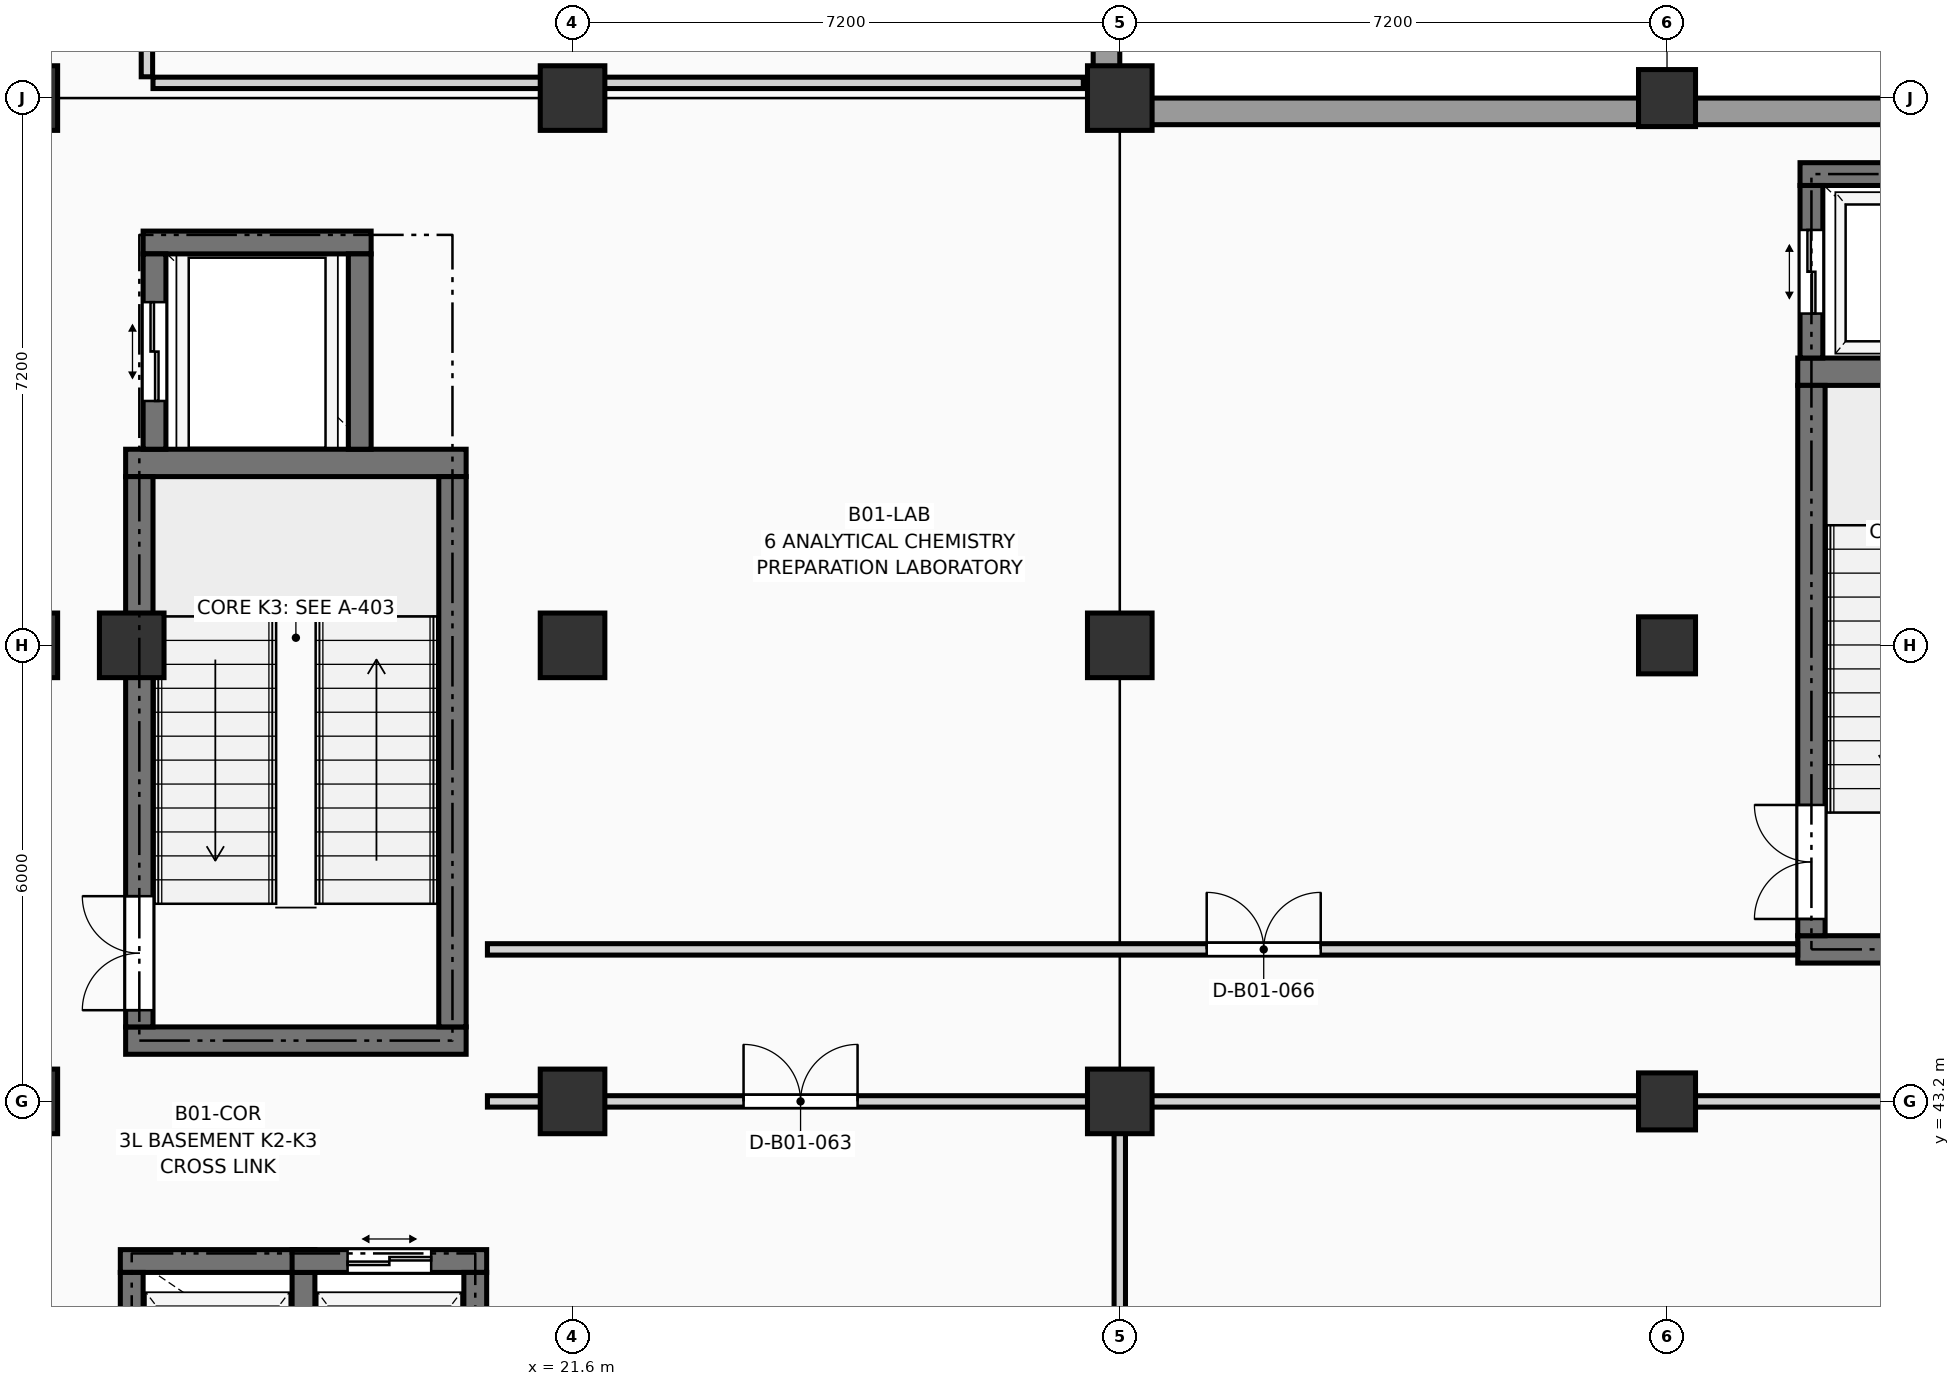
"""IFC4 building model, lengths in metres.
Left out: names, types, materials, properties, quantities, classifications, styles, units other than length and angle.
Written with IfcOpenShell. Run it as: python <this file> out.ifc"""

import sys

from ifc_helpers import new_model, si_unit, direction, frame, frame_2d, origin, origin_2d, place, context, subcontext, project, spatial, rectangle, extrude, element, fill, save


model = new_model("IFC4")
c1 = context("Model", 3, precision=1e-05, world=origin(), true_north=direction((0.0, 1.0)))
c2 = subcontext(c1, "Body", "Model", "MODEL_VIEW")
j1 = project(units=[si_unit("LENGTHUNIT", "METRE"), si_unit("PLANEANGLEUNIT", "RADIAN")], contexts=[c1])
p1 = place(None, origin())
s1 = spatial("IfcSite", under=j1, at=p1, CompositionType="ELEMENT")
p2 = place(p1, origin())
s2 = spatial("IfcBuilding", under=s1, at=p2, CompositionType="ELEMENT")
p3 = place(p2, frame((0.0, 0.0, -4.5)))
s3 = spatial("IfcBuildingStorey", under=s2, at=p3, CompositionType="ELEMENT", Elevation=-4.5)
for number, where, z_axis, x_axis in (
    (1, (14.4, 43.2, 0.0), (0.0, 0.0, 1.0), (1.0, 0.0, 0.0)),
    (2, (14.4, 49.2, 0.0), (0.0, 0.0, 1.0), (1.0, 0.0, 0.0)),
    (3, (14.4, 56.4, 0.0), (0.0, 0.0, 1.0), (1.0, 0.0, 0.0)),
    (4, (15.8, 49.2, 0.0), (0.0, 0.0, 1.0), (1.0, 0.0, 0.0)),
    (5, (21.6, 43.2, 0.0), (0.0, 0.0, 1.0), (1.0, 0.0, 0.0)),
    (6, (21.6, 49.2, 0.0), (0.0, 0.0, 1.0), (1.0, 0.0, 0.0)),
    (7, (21.6, 56.4, 0.0), (0.0, 0.0, 1.0), (1.0, 0.0, 0.0)),
):
    element("IfcColumn", number, at=place(p3, frame(where, z_axis=z_axis, x_axis=x_axis)), inside=s3, PredefinedType="COLUMN", context=c2, shape_type="SweptSolid", body=[
        extrude(rectangle(XDim=0.85, YDim=0.85, at=origin_2d()), origin(), (0.0, 0.0, 1.0), 4.5),
    ])
for number, where, z_axis, x_axis in (
    (8, (28.8, 43.2, -0.3), (0.0, 0.0, 1.0), (1.0, 0.0, 0.0)),
    (9, (28.8, 49.2, -0.3), (0.0, 0.0, 1.0), (1.0, 0.0, 0.0)),
    (10, (28.8, 56.4, -0.3), (0.0, 0.0, 1.0), (1.0, 0.0, 0.0)),
):
    element("IfcColumn", number, at=place(p3, frame(where, z_axis=z_axis, x_axis=x_axis)), inside=s3, PredefinedType="COLUMN", context=c2, shape_type="SweptSolid", body=[
        extrude(rectangle(XDim=0.85, YDim=0.85, at=origin_2d()), origin(), (0.0, 0.0, 1.0), 4.8),
    ])
for number, where, z_axis, x_axis in (
    (11, (36.0, 43.2, 0.0), (0.0, 0.0, 1.0), (1.0, 0.0, 0.0)),
    (12, (36.0, 49.2, 0.0), (0.0, 0.0, 1.0), (1.0, 0.0, 0.0)),
    (13, (36.0, 56.4, 0.0), (0.0, 0.0, 1.0), (1.0, 0.0, 0.0)),
):
    element("IfcColumn", number, at=place(p3, frame(where, z_axis=z_axis, x_axis=x_axis)), inside=s3, PredefinedType="COLUMN", context=c2, shape_type="SweptSolid", body=[
        extrude(rectangle(XDim=0.75, YDim=0.75, at=origin_2d()), origin(), (0.0, 0.0, 1.0), 4.5),
    ])
p4 = place(p3, frame((28.625, 85.2, -0.3), z_axis=(0.0, 0.0, 1.0), x_axis=(0.0, -1.0, 0.0)))
e14 = element("IfcWall", 14, at=p4, inside=s3, PredefinedType="USERDEFINED", context=c2, shape_type="SweptSolid", body=[
    extrude(rectangle(XDim=28.8, YDim=0.35, at=frame_2d((14.4, 0.0))), origin(), (0.0, 0.0, 1.0), 4.54),
])
p5 = place(p3, frame((28.8, 56.225, -0.3), z_axis=(0.0, 0.0, 1.0), x_axis=(1.0, 0.0, 0.0)))
e15 = element("IfcWall", 15, at=p5, inside=s3, PredefinedType="USERDEFINED", context=c2, shape_type="SweptSolid", body=[
    extrude(rectangle(XDim=36.0, YDim=0.35, at=frame_2d((18.0, 0.0))), origin(), (0.0, 0.0, 1.0), 4.54),
])
for number, where, z_axis, x_axis in (
    (16, (15.72, 44.0, -0.3), (0.0, 0.0, 1.0), (1.0, 0.0, 0.0)),
    (17, (15.72, 51.6, -0.3), (0.0, 0.0, 1.0), (1.0, 0.0, 0.0)),
):
    element("IfcWall", number, at=place(p3, frame(where, z_axis=z_axis, x_axis=x_axis)), inside=s3, PredefinedType="SHEAR", context=c2, shape_type="SweptSolid", body=[
        extrude(rectangle(XDim=4.48, YDim=0.36, at=frame_2d((2.24, 0.0))), origin(), (0.0, 0.0, 1.0), 4.54),
    ])
p6 = place(p3, frame((15.9, 44.18, -0.3), z_axis=(0.0, 0.0, 1.0), x_axis=(0.0, 1.0, 0.0)))
e18 = element("IfcWall", 18, at=p6, inside=s3, PredefinedType="SHEAR", context=c2, shape_type="SweptSolid", body=[
    extrude(rectangle(XDim=7.24, YDim=0.36, at=frame_2d((3.62, 0.0))), origin(), (0.0, 0.0, 1.0), 4.54),
])
p7 = place(p6, frame((0.22, 0.0, 0.3)))
e19 = element("IfcOpeningElement", 19, at=p7, cuts=e18, PredefinedType="OPENING", context=c2, shape_type="SweptSolid", body=[
    extrude(rectangle(XDim=1.5, YDim=2.2, at=frame_2d((0.75, 1.1))), frame((0.0, 0.192, 0.0), z_axis=(0.0, -1.0, 0.0), x_axis=(1.0, 0.0, 0.0)), (0.0, 0.0, 1.0), 0.384),
])
p8 = place(p3, frame((20.02, 44.18, -0.3), z_axis=(0.0, 0.0, 1.0), x_axis=(0.0, 1.0, 0.0)))
e20 = element("IfcWall", 20, at=p8, inside=s3, PredefinedType="SHEAR", context=c2, shape_type="SweptSolid", body=[
    extrude(rectangle(XDim=7.24, YDim=0.36, at=frame_2d((3.62, 0.0))), origin(), (0.0, 0.0, 1.0), 4.54),
])
for number, where, z_axis, x_axis in (
    (21, (37.72, 45.2, -0.3), (0.0, 0.0, 1.0), (1.0, 0.0, 0.0)),
    (22, (37.72, 52.8, -0.3), (0.0, 0.0, 1.0), (1.0, 0.0, 0.0)),
):
    element("IfcWall", number, at=place(p3, frame(where, z_axis=z_axis, x_axis=x_axis)), inside=s3, PredefinedType="SHEAR", context=c2, shape_type="SweptSolid", body=[
        extrude(rectangle(XDim=4.48, YDim=0.36, at=frame_2d((2.24, 0.0))), origin(), (0.0, 0.0, 1.0), 4.54),
    ])
p9 = place(p3, frame((37.9, 45.38, -0.3), z_axis=(0.0, 0.0, 1.0), x_axis=(0.0, 1.0, 0.0)))
e23 = element("IfcWall", 23, at=p9, inside=s3, PredefinedType="SHEAR", context=c2, shape_type="SweptSolid", body=[
    extrude(rectangle(XDim=7.24, YDim=0.36, at=frame_2d((3.62, 0.0))), origin(), (0.0, 0.0, 1.0), 4.54),
])
p10 = place(p9, frame((0.22, 0.0, 0.3)))
e24 = element("IfcOpeningElement", 24, at=p10, cuts=e23, PredefinedType="OPENING", context=c2, shape_type="SweptSolid", body=[
    extrude(rectangle(XDim=1.5, YDim=2.2, at=frame_2d((0.75, 1.1))), frame((0.0, 0.192, 0.0), z_axis=(0.0, -1.0, 0.0), x_axis=(1.0, 0.0, 0.0)), (0.0, 0.0, 1.0), 0.384),
])
p11 = place(p3, frame((15.65, 41.1, -1.6), z_axis=(0.0, 0.0, 1.0), x_axis=(1.0, 0.0, 0.0)))
e25 = element("IfcWall", 25, at=p11, inside=s3, PredefinedType="SHEAR", context=c2, shape_type="SweptSolid", body=[
    extrude(rectangle(XDim=2.56, YDim=0.3, at=frame_2d((1.28, 0.0))), origin(), (0.0, 0.0, 1.0), 5.84),
])
p12 = place(p3, frame((15.8, 37.98, -1.6), z_axis=(0.0, 0.0, 1.0), x_axis=(0.0, 1.0, 0.0)))
e26 = element("IfcWall", 26, at=p12, inside=s3, PredefinedType="SHEAR", context=c2, shape_type="SweptSolid", body=[
    extrude(rectangle(XDim=2.97, YDim=0.3, at=frame_2d((1.485, 0.0))), origin(), (0.0, 0.0, 1.0), 5.84),
])
p13 = place(p12, frame((0.935, 0.0, 1.6)))
e27 = element("IfcOpeningElement", 27, at=p13, cuts=e26, PredefinedType="OPENING", context=c2, shape_type="SweptSolid", body=[
    extrude(rectangle(XDim=1.1, YDim=2.2, at=frame_2d((0.55, 1.1))), frame((0.0, 0.162, 0.0), z_axis=(0.0, -1.0, 0.0), x_axis=(1.0, 0.0, 0.0)), (0.0, 0.0, 1.0), 0.324),
])
p14 = place(p3, frame((18.06, 37.98, -1.6), z_axis=(0.0, 0.0, 1.0), x_axis=(0.0, 1.0, 0.0)))
e28 = element("IfcWall", 28, at=p14, inside=s3, PredefinedType="SHEAR", context=c2, shape_type="SweptSolid", body=[
    extrude(rectangle(XDim=2.97, YDim=0.3, at=frame_2d((1.485, 0.0))), origin(), (0.0, 0.0, 1.0), 5.84),
])
p15 = place(p3, frame((17.91, 41.1, -1.6), z_axis=(0.0, 0.0, 1.0), x_axis=(1.0, 0.0, 0.0)))
e29 = element("IfcWall", 29, at=p15, inside=s3, PredefinedType="SHEAR", context=c2, shape_type="SweptSolid", body=[
    extrude(rectangle(XDim=2.56, YDim=0.3, at=frame_2d((1.28, 0.0))), origin(), (0.0, 0.0, 1.0), 5.84),
])
p16 = place(p15, frame((0.73, 0.0, 1.6)))
e30 = element("IfcOpeningElement", 30, at=p16, cuts=e29, PredefinedType="OPENING", context=c2, shape_type="SweptSolid", body=[
    extrude(rectangle(XDim=1.1, YDim=2.2, at=frame_2d((0.55, 1.1))), frame((0.0, 0.162, 0.0), z_axis=(0.0, -1.0, 0.0), x_axis=(1.0, 0.0, 0.0)), (0.0, 0.0, 1.0), 0.324),
])
p17 = place(p3, frame((20.32, 37.98, -1.6), z_axis=(0.0, 0.0, 1.0), x_axis=(0.0, 1.0, 0.0)))
e31 = element("IfcWall", 31, at=p17, inside=s3, PredefinedType="SHEAR", context=c2, shape_type="SweptSolid", body=[
    extrude(rectangle(XDim=2.97, YDim=0.3, at=frame_2d((1.485, 0.0))), origin(), (0.0, 0.0, 1.0), 5.84),
])
p18 = place(p3, frame((37.75, 55.4, -1.6), z_axis=(0.0, 0.0, 1.0), x_axis=(1.0, 0.0, 0.0)))
e32 = element("IfcWall", 32, at=p18, inside=s3, PredefinedType="SHEAR", context=c2, shape_type="SweptSolid", body=[
    extrude(rectangle(XDim=2.7, YDim=0.3, at=frame_2d((1.35, 0.0))), origin(), (0.0, 0.0, 1.0), 5.84),
])
p19 = place(p3, frame((37.9, 52.98, -1.6), z_axis=(0.0, 0.0, 1.0), x_axis=(0.0, 1.0, 0.0)))
e33 = element("IfcWall", 33, at=p19, inside=s3, PredefinedType="SHEAR", context=c2, shape_type="SweptSolid", body=[
    extrude(rectangle(XDim=2.27, YDim=0.3, at=frame_2d((1.135, 0.0))), origin(), (0.0, 0.0, 1.0), 5.84),
])
p20 = place(p19, frame((0.585, 0.0, 1.6)))
e34 = element("IfcOpeningElement", 34, at=p20, cuts=e33, PredefinedType="OPENING", context=c2, shape_type="SweptSolid", body=[
    extrude(rectangle(XDim=1.1, YDim=2.2, at=frame_2d((0.55, 1.1))), frame((0.0, 0.162, 0.0), z_axis=(0.0, -1.0, 0.0), x_axis=(1.0, 0.0, 0.0)), (0.0, 0.0, 1.0), 0.324),
])
p21 = place(p3, frame((15.95, 54.5, -1.6), z_axis=(0.0, 0.0, 1.0), x_axis=(1.0, 0.0, 0.0)))
e35 = element("IfcWall", 35, at=p21, inside=s3, PredefinedType="SHEAR", context=c2, shape_type="SweptSolid", body=[
    extrude(rectangle(XDim=3.0, YDim=0.3, at=frame_2d((1.5, 0.0))), origin(), (0.0, 0.0, 1.0), 5.84),
])
p22 = place(p3, frame((16.1, 51.78, -1.6), z_axis=(0.0, 0.0, 1.0), x_axis=(0.0, 1.0, 0.0)))
e36 = element("IfcWall", 36, at=p22, inside=s3, PredefinedType="SHEAR", context=c2, shape_type="SweptSolid", body=[
    extrude(rectangle(XDim=2.57, YDim=0.3, at=frame_2d((1.285, 0.0))), origin(), (0.0, 0.0, 1.0), 5.84),
])
p23 = place(p22, frame((0.635, 0.0, 1.6)))
e37 = element("IfcOpeningElement", 37, at=p23, cuts=e36, PredefinedType="OPENING", context=c2, shape_type="SweptSolid", body=[
    extrude(rectangle(XDim=1.3, YDim=2.25, at=frame_2d((0.65, 1.125))), frame((0.0, 0.162, 0.0), z_axis=(0.0, -1.0, 0.0), x_axis=(1.0, 0.0, 0.0)), (0.0, 0.0, 1.0), 0.324),
])
p24 = place(p3, frame((18.8, 51.78, -1.6), z_axis=(0.0, 0.0, 1.0), x_axis=(0.0, 1.0, 0.0)))
e38 = element("IfcWall", 38, at=p24, inside=s3, PredefinedType="SHEAR", context=c2, shape_type="SweptSolid", body=[
    extrude(rectangle(XDim=2.57, YDim=0.3, at=frame_2d((1.285, 0.0))), origin(), (0.0, 0.0, 1.0), 5.84),
])
p25 = place(p3, frame((28.8, 27.68, 0.0), z_axis=(0.0, 0.0, 1.0), x_axis=(0.0, 1.0, 0.0)))
e39 = element("IfcWall", 39, at=p25, inside=s3, PredefinedType="PARTITIONING", context=c2, shape_type="SweptSolid", body=[
    extrude(rectangle(XDim=15.44, YDim=0.15, at=frame_2d((7.72, 0.0))), origin(), (0.0, 0.0, 1.0), 3.375),
])
p26 = place(p3, frame((20.48, 43.2, 0.0), z_axis=(0.0, 0.0, 1.0), x_axis=(1.0, 0.0, 0.0)))
e40 = element("IfcWall", 40, at=p26, inside=s3, PredefinedType="PARTITIONING", context=c2, shape_type="SweptSolid", body=[
    extrude(rectangle(XDim=8.24, YDim=0.15, at=frame_2d((4.12, 0.0))), origin(), (0.0, 0.0, 1.0), 3.375),
])
p27 = place(p26, frame((3.37, 0.0, 0.0)))
e41 = element("IfcOpeningElement", 41, at=p27, cuts=e40, PredefinedType="OPENING", context=c2, shape_type="SweptSolid", body=[
    extrude(rectangle(XDim=1.5, YDim=2.2, at=frame_2d((0.75, 1.1))), frame((0.0, 0.087, 0.0), z_axis=(0.0, -1.0, 0.0), x_axis=(1.0, 0.0, 0.0)), (0.0, 0.0, 1.0), 0.174),
])
p28 = place(p3, frame((28.88, 43.2, 0.0), z_axis=(0.0, 0.0, 1.0), x_axis=(1.0, 0.0, 0.0)))
e42 = element("IfcWall", 42, at=p28, inside=s3, PredefinedType="PARTITIONING", context=c2, shape_type="SweptSolid", body=[
    extrude(rectangle(XDim=17.84, YDim=0.15, at=frame_2d((8.92, 0.0))), origin(), (0.0, 0.0, 1.0), 3.375),
])
p29 = place(p3, frame((20.48, 45.2, 0.0), z_axis=(0.0, 0.0, 1.0), x_axis=(1.0, 0.0, 0.0)))
e43 = element("IfcWall", 43, at=p29, inside=s3, PredefinedType="PARTITIONING", context=c2, shape_type="SweptSolid", body=[
    extrude(rectangle(XDim=17.24, YDim=0.15, at=frame_2d((8.62, 0.0))), origin(), (0.0, 0.0, 1.0), 4.225),
])
p30 = place(p29, frame((9.464, 0.0, 0.0)))
e44 = element("IfcOpeningElement", 44, at=p30, cuts=e43, PredefinedType="OPENING", context=c2, shape_type="SweptSolid", body=[
    extrude(rectangle(XDim=1.5, YDim=2.2, at=frame_2d((0.75, 1.1))), frame((0.0, 0.087, 0.0), z_axis=(0.0, -1.0, 0.0), x_axis=(1.0, 0.0, 0.0)), (0.0, 0.0, 1.0), 0.174),
])
p31 = place(p3, frame((16.0, 56.68, 0.0), z_axis=(0.0, 0.0, 1.0), x_axis=(0.0, 1.0, 0.0)))
e45 = element("IfcWall", 45, at=p31, inside=s3, PredefinedType="PARTITIONING", context=c2, shape_type="SweptSolid", body=[
    extrude(rectangle(XDim=15.1, YDim=0.15, at=frame_2d((7.55, 0.0))), origin(), (0.0, 0.0, 1.0), 4.225),
])
p32 = place(p31, frame((8.445, 0.0, 0.0)))
e46 = element("IfcOpeningElement", 46, at=p32, cuts=e45, PredefinedType="OPENING", context=c2, shape_type="SweptSolid", body=[
    extrude(rectangle(XDim=1.5, YDim=2.2, at=frame_2d((0.75, 1.1))), frame((0.0, 0.087, 0.0), z_axis=(0.0, -1.0, 0.0), x_axis=(1.0, 0.0, 0.0)), (0.0, 0.0, 1.0), 0.174),
])
p33 = place(p3, frame((16.08, 56.6, 0.0), z_axis=(0.0, 0.0, 1.0), x_axis=(1.0, 0.0, 0.0)))
e47 = element("IfcWall", 47, at=p33, inside=s3, PredefinedType="PARTITIONING", context=c2, shape_type="SweptSolid", body=[
    extrude(rectangle(XDim=12.24, YDim=0.15, at=frame_2d((6.12, 0.0))), origin(), (0.0, 0.0, 1.0), 3.375),
])
p34 = place(p7, origin())
e48 = element("IfcDoor", 48, at=p34, inside=s3, OperationType="DOUBLE_DOOR_SINGLE_SWING", PredefinedType="DOOR", context=c2, shape_type="SweptSolid", body=[
    extrude(rectangle(XDim=1.5, YDim=2.2, at=frame_2d((0.75, 1.1))), frame((0.0, 0.025, 0.0), z_axis=(0.0, -1.0, 0.0), x_axis=(1.0, 0.0, 0.0)), (0.0, 0.0, 1.0), 0.05),
])
fill(e19, e48)
p35 = place(p10, origin())
e49 = element("IfcDoor", 49, at=p35, inside=s3, OperationType="DOUBLE_DOOR_SINGLE_SWING", PredefinedType="DOOR", context=c2, shape_type="SweptSolid", body=[
    extrude(rectangle(XDim=1.5, YDim=2.2, at=frame_2d((0.75, 1.1))), frame((0.0, 0.025, 0.0), z_axis=(0.0, -1.0, 0.0), x_axis=(1.0, 0.0, 0.0)), (0.0, 0.0, 1.0), 0.05),
])
fill(e24, e49)
p36 = place(p16, origin())
e50 = element("IfcDoor", 50, at=p36, inside=s3, OperationType="DOUBLE_DOOR_SLIDING", PredefinedType="DOOR", context=c2, shape_type="SweptSolid", body=[
    extrude(rectangle(XDim=1.1, YDim=2.2, at=frame_2d((0.55, 1.1))), frame((0.0, 0.025, 0.0), z_axis=(0.0, -1.0, 0.0), x_axis=(1.0, 0.0, 0.0)), (0.0, 0.0, 1.0), 0.05),
])
fill(e30, e50)
p37 = place(p20, origin())
e51 = element("IfcDoor", 51, at=p37, inside=s3, OperationType="DOUBLE_DOOR_SLIDING", PredefinedType="DOOR", context=c2, shape_type="SweptSolid", body=[
    extrude(rectangle(XDim=1.1, YDim=2.2, at=frame_2d((0.55, 1.1))), frame((0.0, 0.025, 0.0), z_axis=(0.0, -1.0, 0.0), x_axis=(1.0, 0.0, 0.0)), (0.0, 0.0, 1.0), 0.05),
])
fill(e34, e51)
p38 = place(p23, origin())
e52 = element("IfcDoor", 52, at=p38, inside=s3, OperationType="DOUBLE_DOOR_SLIDING", PredefinedType="DOOR", context=c2, shape_type="SweptSolid", body=[
    extrude(rectangle(XDim=1.3, YDim=2.25, at=frame_2d((0.65, 1.125))), frame((0.0, 0.025, 0.0), z_axis=(0.0, -1.0, 0.0), x_axis=(1.0, 0.0, 0.0)), (0.0, 0.0, 1.0), 0.05),
])
fill(e37, e52)
p39 = place(p27, origin())
e53 = element("IfcDoor", 53, at=p39, inside=s3, OperationType="DOUBLE_DOOR_SINGLE_SWING", PredefinedType="DOOR", context=c2, shape_type="SweptSolid", body=[
    extrude(rectangle(XDim=1.5, YDim=2.2, at=frame_2d((0.75, 1.1))), frame((0.0, 0.025, 0.0), z_axis=(0.0, -1.0, 0.0), x_axis=(1.0, 0.0, 0.0)), (0.0, 0.0, 1.0), 0.05),
])
fill(e41, e53)
p40 = place(p30, origin())
e54 = element("IfcDoor", 54, at=p40, inside=s3, OperationType="DOUBLE_DOOR_SINGLE_SWING", PredefinedType="DOOR", context=c2, shape_type="SweptSolid", body=[
    extrude(rectangle(XDim=1.5, YDim=2.2, at=frame_2d((0.75, 1.1))), frame((0.0, 0.025, 0.0), z_axis=(0.0, -1.0, 0.0), x_axis=(1.0, 0.0, 0.0)), (0.0, 0.0, 1.0), 0.05),
])
fill(e44, e54)
save(model, sys.argv[1])
